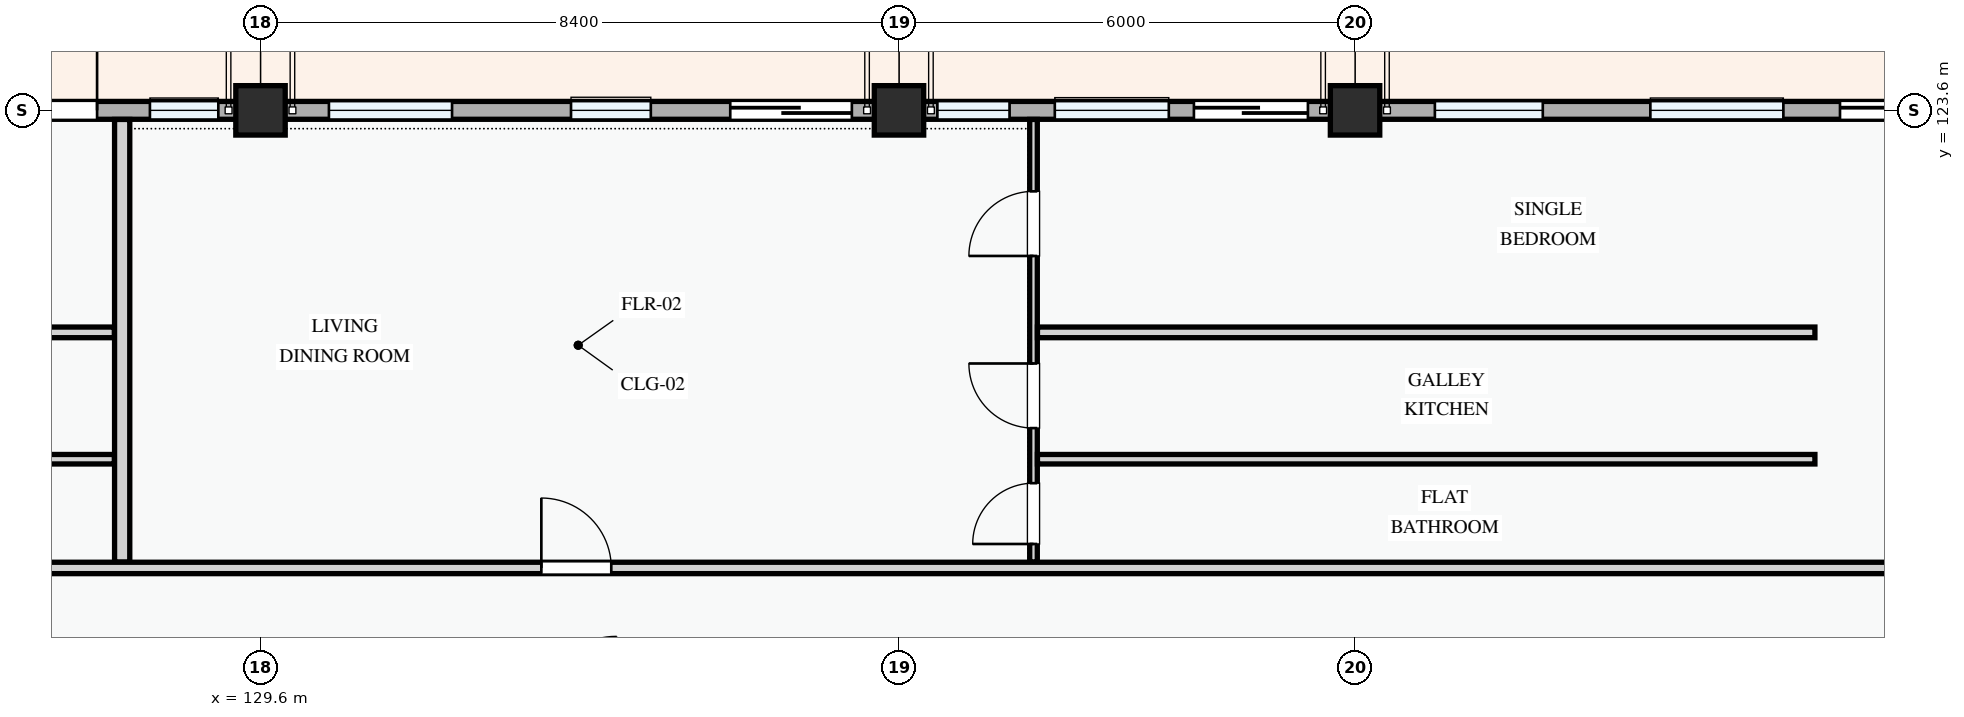
"""IFC4 building model, lengths in metres.
Left out: names, types, materials, properties, quantities, classifications, styles, units other than length and angle.
Written with IfcOpenShell. Run it as: python <this file> out.ifc"""

import sys

from ifc_helpers import new_model, si_unit, direction, frame, frame_2d, origin, origin_2d, place, context, subcontext, project, spatial, rectangle, extrude, element, fill, save


model = new_model("IFC4")
c1 = context("Model", 3, precision=1e-05, world=origin(), true_north=direction((0.0, 1.0)))
c2 = subcontext(c1, "Body", "Model", "MODEL_VIEW")
j1 = project(units=[si_unit("LENGTHUNIT", "METRE"), si_unit("PLANEANGLEUNIT", "RADIAN")], contexts=[c1])
p1 = place(None, origin())
s1 = spatial("IfcSite", under=j1, at=p1, CompositionType="ELEMENT")
p2 = place(p1, origin())
s2 = spatial("IfcBuilding", under=s1, at=p2, CompositionType="ELEMENT")
p3 = place(p2, frame((0.0, 0.0, 8.1)))
s3 = spatial("IfcBuildingStorey", under=s2, at=p3, CompositionType="ELEMENT", Elevation=8.1)
for number, where, z_axis, x_axis in (
    (1, (129.6, 123.6, 0.0), (0.0, 0.0, 1.0), (1.0, 0.0, 0.0)),
    (2, (138.0, 123.6, 0.0), (0.0, 0.0, 1.0), (1.0, 0.0, 0.0)),
    (3, (144.0, 123.6, 0.0), (0.0, 0.0, 1.0), (1.0, 0.0, 0.0)),
):
    element("IfcColumn", number, at=place(p3, frame(where, z_axis=z_axis, x_axis=x_axis)), inside=s3, PredefinedType="COLUMN", context=c2, shape_type="SweptSolid", body=[
        extrude(rectangle(XDim=0.65, YDim=0.65, at=origin_2d()), origin(), (0.0, 0.0, 1.0), 3.3),
    ])
p4 = place(p3, frame((152.4, 123.6, 0.0), z_axis=(0.0, 0.0, 1.0), x_axis=(-1.0, 0.0, 0.0)))
e4 = element("IfcWall", 4, at=p4, inside=s3, PredefinedType="STANDARD", context=c2, shape_type="SweptSolid", body=[
    extrude(rectangle(XDim=8.4, YDim=0.235, at=frame_2d((4.2, 0.0))), origin(), (0.0, 0.0, 1.0), 2.345),
])
p5 = place(p4, frame((0.62, 0.0, 0.0)))
e5 = element("IfcOpeningElement", 5, at=p5, cuts=e4, PredefinedType="OPENING", context=c2, shape_type="SweptSolid", body=[
    extrude(rectangle(XDim=1.4, YDim=2.2, at=frame_2d((0.7, 1.1))), frame((0.0, 0.127, 0.0), z_axis=(0.0, -1.0, 0.0), x_axis=(1.0, 0.0, 0.0)), (0.0, 0.0, 1.0), 0.255),
])
p6 = place(p4, frame((2.765, 0.0, 0.78)))
e6 = element("IfcOpeningElement", 6, at=p6, cuts=e4, PredefinedType="OPENING", context=c2, shape_type="SweptSolid", body=[
    extrude(rectangle(XDim=1.75, YDim=1.45, at=frame_2d((0.875, 0.725))), frame((0.0, 0.127, 0.0), z_axis=(0.0, -1.0, 0.0), x_axis=(1.0, 0.0, 0.0)), (0.0, 0.0, 1.0), 0.255),
])
p7 = place(p4, frame((5.93, 0.0, 0.78)))
e7 = element("IfcOpeningElement", 7, at=p7, cuts=e4, PredefinedType="OPENING", context=c2, shape_type="SweptSolid", body=[
    extrude(rectangle(XDim=1.42, YDim=1.38, at=frame_2d((0.71, 0.69))), frame((0.0, 0.127, 0.0), z_axis=(0.0, -1.0, 0.0), x_axis=(1.0, 0.0, 0.0)), (0.0, 0.0, 1.0), 0.255),
])
p8 = place(p3, frame((144.0, 123.6, 0.0), z_axis=(0.0, 0.0, 1.0), x_axis=(-1.0, 0.0, 0.0)))
e8 = element("IfcWall", 8, at=p8, inside=s3, PredefinedType="STANDARD", context=c2, shape_type="SweptSolid", body=[
    extrude(rectangle(XDim=6.0, YDim=0.235, at=frame_2d((3.0, 0.0))), origin(), (0.0, 0.0, 1.0), 2.445),
])
p9 = place(p8, frame((0.62, 0.0, 0.0)))
e9 = element("IfcOpeningElement", 9, at=p9, cuts=e8, PredefinedType="OPENING", context=c2, shape_type="SweptSolid", body=[
    extrude(rectangle(XDim=1.5, YDim=2.2, at=frame_2d((0.75, 1.1))), frame((0.0, 0.127, 0.0), z_axis=(0.0, -1.0, 0.0), x_axis=(1.0, 0.0, 0.0)), (0.0, 0.0, 1.0), 0.255),
])
p10 = place(p8, frame((2.45, 0.0, 0.78)))
e10 = element("IfcOpeningElement", 10, at=p10, cuts=e8, PredefinedType="OPENING", context=c2, shape_type="SweptSolid", body=[
    extrude(rectangle(XDim=1.5, YDim=1.5, at=frame_2d((0.75, 0.75))), frame((0.0, 0.127, 0.0), z_axis=(0.0, -1.0, 0.0), x_axis=(1.0, 0.0, 0.0)), (0.0, 0.0, 1.0), 0.255),
])
p11 = place(p8, frame((4.545, 0.0, 0.78)))
e11 = element("IfcOpeningElement", 11, at=p11, cuts=e8, PredefinedType="OPENING", context=c2, shape_type="SweptSolid", body=[
    extrude(rectangle(XDim=0.95, YDim=1.15, at=frame_2d((0.475, 0.575))), frame((0.0, 0.127, 0.0), z_axis=(0.0, -1.0, 0.0), x_axis=(1.0, 0.0, 0.0)), (0.0, 0.0, 1.0), 0.255),
])
p12 = place(p3, frame((138.0, 123.6, 0.0), z_axis=(0.0, 0.0, 1.0), x_axis=(-1.0, 0.0, 0.0)))
e12 = element("IfcWall", 12, at=p12, inside=s3, PredefinedType="STANDARD", context=c2, shape_type="SweptSolid", body=[
    extrude(rectangle(XDim=8.4, YDim=0.235, at=frame_2d((4.2, 0.0))), origin(), (0.0, 0.0, 1.0), 2.345),
])
p13 = place(p12, frame((0.62, 0.0, 0.0)))
e13 = element("IfcOpeningElement", 13, at=p13, cuts=e12, PredefinedType="OPENING", context=c2, shape_type="SweptSolid", body=[
    extrude(rectangle(XDim=1.6, YDim=2.2, at=frame_2d((0.8, 1.1))), frame((0.0, 0.127, 0.0), z_axis=(0.0, -1.0, 0.0), x_axis=(1.0, 0.0, 0.0)), (0.0, 0.0, 1.0), 0.255),
])
p14 = place(p12, frame((3.265, 0.0, 0.78)))
e14 = element("IfcOpeningElement", 14, at=p14, cuts=e12, PredefinedType="OPENING", context=c2, shape_type="SweptSolid", body=[
    extrude(rectangle(XDim=1.05, YDim=1.2, at=frame_2d((0.525, 0.6))), frame((0.0, 0.127, 0.0), z_axis=(0.0, -1.0, 0.0), x_axis=(1.0, 0.0, 0.0)), (0.0, 0.0, 1.0), 0.255),
])
p15 = place(p12, frame((5.88, 0.0, 0.78)))
e15 = element("IfcOpeningElement", 15, at=p15, cuts=e12, PredefinedType="OPENING", context=c2, shape_type="SweptSolid", body=[
    extrude(rectangle(XDim=1.62, YDim=1.38, at=frame_2d((0.81, 0.69))), frame((0.0, 0.127, 0.0), z_axis=(0.0, -1.0, 0.0), x_axis=(1.0, 0.0, 0.0)), (0.0, 0.0, 1.0), 0.255),
])
p16 = place(p3, frame((129.6, 123.6, 0.0), z_axis=(0.0, 0.0, 1.0), x_axis=(-1.0, 0.0, 0.0)))
e16 = element("IfcWall", 16, at=p16, inside=s3, PredefinedType="STANDARD", context=c2, shape_type="SweptSolid", body=[
    extrude(rectangle(XDim=6.0, YDim=0.235, at=frame_2d((3.0, 0.0))), origin(), (0.0, 0.0, 1.0), 2.445),
])
p17 = place(p16, frame((2.15, 0.0, 0.0)))
e17 = element("IfcOpeningElement", 17, at=p17, cuts=e16, PredefinedType="OPENING", context=c2, shape_type="SweptSolid", body=[
    extrude(rectangle(XDim=1.05, YDim=2.15, at=frame_2d((0.525, 1.075))), frame((0.0, 0.127, 0.0), z_axis=(0.0, -1.0, 0.0), x_axis=(1.0, 0.0, 0.0)), (0.0, 0.0, 1.0), 0.255),
])
p18 = place(p16, frame((0.555, 0.0, 0.78)))
e18 = element("IfcOpeningElement", 18, at=p18, cuts=e16, PredefinedType="OPENING", context=c2, shape_type="SweptSolid", body=[
    extrude(rectangle(XDim=0.9, YDim=1.2, at=frame_2d((0.45, 0.6))), frame((0.0, 0.127, 0.0), z_axis=(0.0, -1.0, 0.0), x_axis=(1.0, 0.0, 0.0)), (0.0, 0.0, 1.0), 0.255),
])
p19 = place(p16, frame((3.88, 0.0, 0.78)))
e19 = element("IfcOpeningElement", 19, at=p19, cuts=e16, PredefinedType="OPENING", context=c2, shape_type="SweptSolid", body=[
    extrude(rectangle(XDim=1.3, YDim=1.4, at=frame_2d((0.65, 0.7))), frame((0.0, 0.127, 0.0), z_axis=(0.0, -1.0, 0.0), x_axis=(1.0, 0.0, 0.0)), (0.0, 0.0, 1.0), 0.255),
])
p20 = place(p3, frame((117.029, 120.679, 0.0), z_axis=(0.0, 0.0, 1.0), x_axis=(1.0, 0.0, 0.0)))
e20 = element("IfcWall", 20, at=p20, inside=s3, PredefinedType="PARTITIONING", context=c2, shape_type="SweptSolid", body=[
    extrude(rectangle(XDim=10.649, YDim=0.14, at=frame_2d((5.325, 0.0))), origin(), (0.0, 0.0, 1.0), 3.0),
])
p21 = place(p3, frame((117.029, 119.01, 0.0), z_axis=(0.0, 0.0, 1.0), x_axis=(1.0, 0.0, 0.0)))
e21 = element("IfcWall", 21, at=p21, inside=s3, PredefinedType="PARTITIONING", context=c2, shape_type="SweptSolid", body=[
    extrude(rectangle(XDim=10.649, YDim=0.125, at=frame_2d((5.325, 0.0))), origin(), (0.0, 0.0, 1.0), 3.0),
])
p22 = place(p3, frame((139.77, 117.657, 0.0), z_axis=(0.0, 0.0, 1.0), x_axis=(0.0, 1.0, 0.0)))
e22 = element("IfcWall", 22, at=p22, inside=s3, PredefinedType="PARTITIONING", context=c2, shape_type="SweptSolid", body=[
    extrude(rectangle(XDim=5.823, YDim=0.1, at=frame_2d((2.912, 0.0))), origin(), (0.0, 0.0, 1.0), 3.0),
])
p23 = place(p22, frame((0.238, 0.0, 0.0)))
e23 = element("IfcOpeningElement", 23, at=p23, cuts=e22, PredefinedType="OPENING", context=c2, shape_type="SweptSolid", body=[
    extrude(rectangle(XDim=0.8, YDim=2.1, at=frame_2d((0.4, 1.05))), frame((0.0, 0.06, 0.0), z_axis=(0.0, -1.0, 0.0), x_axis=(1.0, 0.0, 0.0)), (0.0, 0.0, 1.0), 0.12),
])
p24 = place(p22, frame((1.763, 0.0, 0.0)))
e24 = element("IfcOpeningElement", 24, at=p24, cuts=e22, PredefinedType="OPENING", context=c2, shape_type="SweptSolid", body=[
    extrude(rectangle(XDim=0.85, YDim=2.1, at=frame_2d((0.425, 1.05))), frame((0.0, 0.06, 0.0), z_axis=(0.0, -1.0, 0.0), x_axis=(1.0, 0.0, 0.0)), (0.0, 0.0, 1.0), 0.12),
])
p25 = place(p22, frame((4.028, 0.0, 0.0)))
e25 = element("IfcOpeningElement", 25, at=p25, cuts=e22, PredefinedType="OPENING", context=c2, shape_type="SweptSolid", body=[
    extrude(rectangle(XDim=0.85, YDim=2.1, at=frame_2d((0.425, 1.05))), frame((0.0, 0.06, 0.0), z_axis=(0.0, -1.0, 0.0), x_axis=(1.0, 0.0, 0.0)), (0.0, 0.0, 1.0), 0.12),
])
p26 = place(p3, frame((139.822, 120.679, 0.0), z_axis=(0.0, 0.0, 1.0), x_axis=(1.0, 0.0, 0.0)))
e26 = element("IfcWall", 26, at=p26, inside=s3, PredefinedType="PARTITIONING", context=c2, shape_type="SweptSolid", body=[
    extrude(rectangle(XDim=10.229, YDim=0.14, at=frame_2d((5.114, 0.0))), origin(), (0.0, 0.0, 1.0), 3.0),
])
p27 = place(p3, frame((139.822, 119.01, 0.0), z_axis=(0.0, 0.0, 1.0), x_axis=(1.0, 0.0, 0.0)))
e27 = element("IfcWall", 27, at=p27, inside=s3, PredefinedType="PARTITIONING", context=c2, shape_type="SweptSolid", body=[
    extrude(rectangle(XDim=10.229, YDim=0.125, at=frame_2d((5.114, 0.0))), origin(), (0.0, 0.0, 1.0), 3.0),
])
p28 = place(p3, frame((127.78, 117.657, 0.0), z_axis=(0.0, 0.0, 1.0), x_axis=(0.0, 1.0, 0.0)))
e28 = element("IfcWall", 28, at=p28, inside=s3, PredefinedType="PARTITIONING", context=c2, shape_type="SweptSolid", body=[
    extrude(rectangle(XDim=5.823, YDim=0.2, at=frame_2d((2.912, 0.0))), origin(), (0.0, 0.0, 1.0), 3.0),
])
p29 = place(p3, frame((80.52, 117.58, 0.0), z_axis=(0.0, 0.0, 1.0), x_axis=(1.0, 0.0, 0.0)))
e29 = element("IfcWall", 29, at=p29, inside=s3, PredefinedType="PARTITIONING", context=c2, shape_type="SweptSolid", body=[
    extrude(rectangle(XDim=72.021, YDim=0.15, at=frame_2d((36.01, 0.0))), origin(), (0.0, 0.0, 1.0), 3.0),
])
p30 = place(p29, frame((9.469, 0.0, 0.0)))
e30 = element("IfcOpeningElement", 30, at=p30, cuts=e29, PredefinedType="OPENING", context=c2, shape_type="SweptSolid", body=[
    extrude(rectangle(XDim=0.92, YDim=2.1, at=frame_2d((0.46, 1.05))), frame((0.0, 0.085, 0.0), z_axis=(0.0, -1.0, 0.0), x_axis=(1.0, 0.0, 0.0)), (0.0, 0.0, 1.0), 0.17),
])
p31 = place(p29, frame((23.851, 0.0, 0.0)))
e31 = element("IfcOpeningElement", 31, at=p31, cuts=e29, PredefinedType="OPENING", context=c2, shape_type="SweptSolid", body=[
    extrude(rectangle(XDim=0.92, YDim=2.1, at=frame_2d((0.46, 1.05))), frame((0.0, 0.085, 0.0), z_axis=(0.0, -1.0, 0.0), x_axis=(1.0, 0.0, 0.0)), (0.0, 0.0, 1.0), 0.17),
])
p32 = place(p29, frame((52.775, 0.0, 0.0)))
e32 = element("IfcOpeningElement", 32, at=p32, cuts=e29, PredefinedType="OPENING", context=c2, shape_type="SweptSolid", body=[
    extrude(rectangle(XDim=0.92, YDim=2.1, at=frame_2d((0.46, 1.05))), frame((0.0, 0.085, 0.0), z_axis=(0.0, -1.0, 0.0), x_axis=(1.0, 0.0, 0.0)), (0.0, 0.0, 1.0), 0.17),
])
p33 = place(p5, frame((1.4, 0.0, 0.0), z_axis=(0.0, 0.0, 1.0), x_axis=(-1.0, 0.0, 0.0)))
e33 = element("IfcDoor", 33, at=p33, inside=s3, OperationType="SLIDING_TO_LEFT", PredefinedType="DOOR", context=c2, shape_type="SweptSolid", body=[
    extrude(rectangle(XDim=1.4, YDim=2.2, at=frame_2d((0.7, 1.1))), frame((0.0, 0.025, 0.0), z_axis=(0.0, -1.0, 0.0), x_axis=(1.0, 0.0, 0.0)), (0.0, 0.0, 1.0), 0.05),
])
fill(e5, e33)
p34 = place(p6, origin())
e34 = element("IfcWindow", 34, at=p34, inside=s3, PartitioningType="DOUBLE_PANEL_VERTICAL", PredefinedType="WINDOW", context=c2, shape_type="SweptSolid", body=[
    extrude(rectangle(XDim=1.75, YDim=1.45, at=frame_2d((0.875, 0.725))), frame((0.0, 0.03, 0.0), z_axis=(0.0, -1.0, 0.0), x_axis=(1.0, 0.0, 0.0)), (0.0, 0.0, 1.0), 0.06),
])
fill(e6, e34)
p35 = place(p7, origin())
e35 = element("IfcWindow", 35, at=p35, inside=s3, PartitioningType="SINGLE_PANEL", PredefinedType="WINDOW", context=c2, shape_type="SweptSolid", body=[
    extrude(rectangle(XDim=1.42, YDim=1.38, at=frame_2d((0.71, 0.69))), frame((0.0, 0.03, 0.0), z_axis=(0.0, -1.0, 0.0), x_axis=(1.0, 0.0, 0.0)), (0.0, 0.0, 1.0), 0.06),
])
fill(e7, e35)
p36 = place(p9, frame((1.5, 0.0, 0.0), z_axis=(0.0, 0.0, 1.0), x_axis=(-1.0, 0.0, 0.0)))
e36 = element("IfcDoor", 36, at=p36, inside=s3, OperationType="SLIDING_TO_RIGHT", PredefinedType="DOOR", context=c2, shape_type="SweptSolid", body=[
    extrude(rectangle(XDim=1.5, YDim=2.2, at=frame_2d((0.75, 1.1))), frame((0.0, 0.025, 0.0), z_axis=(0.0, -1.0, 0.0), x_axis=(1.0, 0.0, 0.0)), (0.0, 0.0, 1.0), 0.05),
])
fill(e9, e36)
p37 = place(p10, origin())
e37 = element("IfcWindow", 37, at=p37, inside=s3, PartitioningType="SINGLE_PANEL", PredefinedType="WINDOW", context=c2, shape_type="SweptSolid", body=[
    extrude(rectangle(XDim=1.5, YDim=1.5, at=frame_2d((0.75, 0.75))), frame((0.0, 0.03, 0.0), z_axis=(0.0, -1.0, 0.0), x_axis=(1.0, 0.0, 0.0)), (0.0, 0.0, 1.0), 0.06),
])
fill(e10, e37)
p38 = place(p11, origin())
e38 = element("IfcWindow", 38, at=p38, inside=s3, PartitioningType="SINGLE_PANEL", PredefinedType="WINDOW", context=c2, shape_type="SweptSolid", body=[
    extrude(rectangle(XDim=0.95, YDim=1.15, at=frame_2d((0.475, 0.575))), frame((0.0, 0.03, 0.0), z_axis=(0.0, -1.0, 0.0), x_axis=(1.0, 0.0, 0.0)), (0.0, 0.0, 1.0), 0.06),
])
fill(e11, e38)
p39 = place(p13, frame((1.6, 0.0, 0.0), z_axis=(0.0, 0.0, 1.0), x_axis=(-1.0, 0.0, 0.0)))
e39 = element("IfcDoor", 39, at=p39, inside=s3, OperationType="SLIDING_TO_LEFT", PredefinedType="DOOR", context=c2, shape_type="SweptSolid", body=[
    extrude(rectangle(XDim=1.6, YDim=2.2, at=frame_2d((0.8, 1.1))), frame((0.0, 0.025, 0.0), z_axis=(0.0, -1.0, 0.0), x_axis=(1.0, 0.0, 0.0)), (0.0, 0.0, 1.0), 0.05),
])
fill(e13, e39)
p40 = place(p14, origin())
e40 = element("IfcWindow", 40, at=p40, inside=s3, PartitioningType="SINGLE_PANEL", PredefinedType="WINDOW", context=c2, shape_type="SweptSolid", body=[
    extrude(rectangle(XDim=1.05, YDim=1.2, at=frame_2d((0.525, 0.6))), frame((0.0, 0.03, 0.0), z_axis=(0.0, -1.0, 0.0), x_axis=(1.0, 0.0, 0.0)), (0.0, 0.0, 1.0), 0.06),
])
fill(e14, e40)
p41 = place(p15, origin())
e41 = element("IfcWindow", 41, at=p41, inside=s3, PartitioningType="DOUBLE_PANEL_VERTICAL", PredefinedType="WINDOW", context=c2, shape_type="SweptSolid", body=[
    extrude(rectangle(XDim=1.62, YDim=1.38, at=frame_2d((0.81, 0.69))), frame((0.0, 0.03, 0.0), z_axis=(0.0, -1.0, 0.0), x_axis=(1.0, 0.0, 0.0)), (0.0, 0.0, 1.0), 0.06),
])
fill(e15, e41)
p42 = place(p17, frame((1.05, 0.0, 0.0), z_axis=(0.0, 0.0, 1.0), x_axis=(-1.0, 0.0, 0.0)))
e42 = element("IfcDoor", 42, at=p42, inside=s3, OperationType="SINGLE_SWING_RIGHT", PredefinedType="DOOR", context=c2, shape_type="SweptSolid", body=[
    extrude(rectangle(XDim=1.05, YDim=2.15, at=frame_2d((0.525, 1.075))), frame((0.0, 0.025, 0.0), z_axis=(0.0, -1.0, 0.0), x_axis=(1.0, 0.0, 0.0)), (0.0, 0.0, 1.0), 0.05),
])
fill(e17, e42)
p43 = place(p18, origin())
e43 = element("IfcWindow", 43, at=p43, inside=s3, PartitioningType="SINGLE_PANEL", PredefinedType="WINDOW", context=c2, shape_type="SweptSolid", body=[
    extrude(rectangle(XDim=0.9, YDim=1.2, at=frame_2d((0.45, 0.6))), frame((0.0, 0.03, 0.0), z_axis=(0.0, -1.0, 0.0), x_axis=(1.0, 0.0, 0.0)), (0.0, 0.0, 1.0), 0.06),
])
fill(e18, e43)
p44 = place(p23, origin())
e44 = element("IfcDoor", 44, at=p44, inside=s3, OperationType="SINGLE_SWING_LEFT", PredefinedType="DOOR", context=c2, shape_type="SweptSolid", body=[
    extrude(rectangle(XDim=0.8, YDim=2.1, at=frame_2d((0.4, 1.05))), frame((0.0, 0.025, 0.0), z_axis=(0.0, -1.0, 0.0), x_axis=(1.0, 0.0, 0.0)), (0.0, 0.0, 1.0), 0.05),
])
fill(e23, e44)
p45 = place(p24, origin())
e45 = element("IfcDoor", 45, at=p45, inside=s3, OperationType="SINGLE_SWING_RIGHT", PredefinedType="DOOR", context=c2, shape_type="SweptSolid", body=[
    extrude(rectangle(XDim=0.85, YDim=2.1, at=frame_2d((0.425, 1.05))), frame((0.0, 0.025, 0.0), z_axis=(0.0, -1.0, 0.0), x_axis=(1.0, 0.0, 0.0)), (0.0, 0.0, 1.0), 0.05),
])
fill(e24, e45)
p46 = place(p25, origin())
e46 = element("IfcDoor", 46, at=p46, inside=s3, OperationType="SINGLE_SWING_LEFT", PredefinedType="DOOR", context=c2, shape_type="SweptSolid", body=[
    extrude(rectangle(XDim=0.85, YDim=2.1, at=frame_2d((0.425, 1.05))), frame((0.0, 0.025, 0.0), z_axis=(0.0, -1.0, 0.0), x_axis=(1.0, 0.0, 0.0)), (0.0, 0.0, 1.0), 0.05),
])
fill(e25, e46)
p47 = place(p32, origin())
e47 = element("IfcDoor", 47, at=p47, inside=s3, OperationType="SINGLE_SWING_LEFT", PredefinedType="DOOR", context=c2, shape_type="SweptSolid", body=[
    extrude(rectangle(XDim=0.92, YDim=2.1, at=frame_2d((0.46, 1.05))), frame((0.0, 0.025, 0.0), z_axis=(0.0, -1.0, 0.0), x_axis=(1.0, 0.0, 0.0)), (0.0, 0.0, 1.0), 0.05),
])
fill(e32, e47)
save(model, sys.argv[1])
